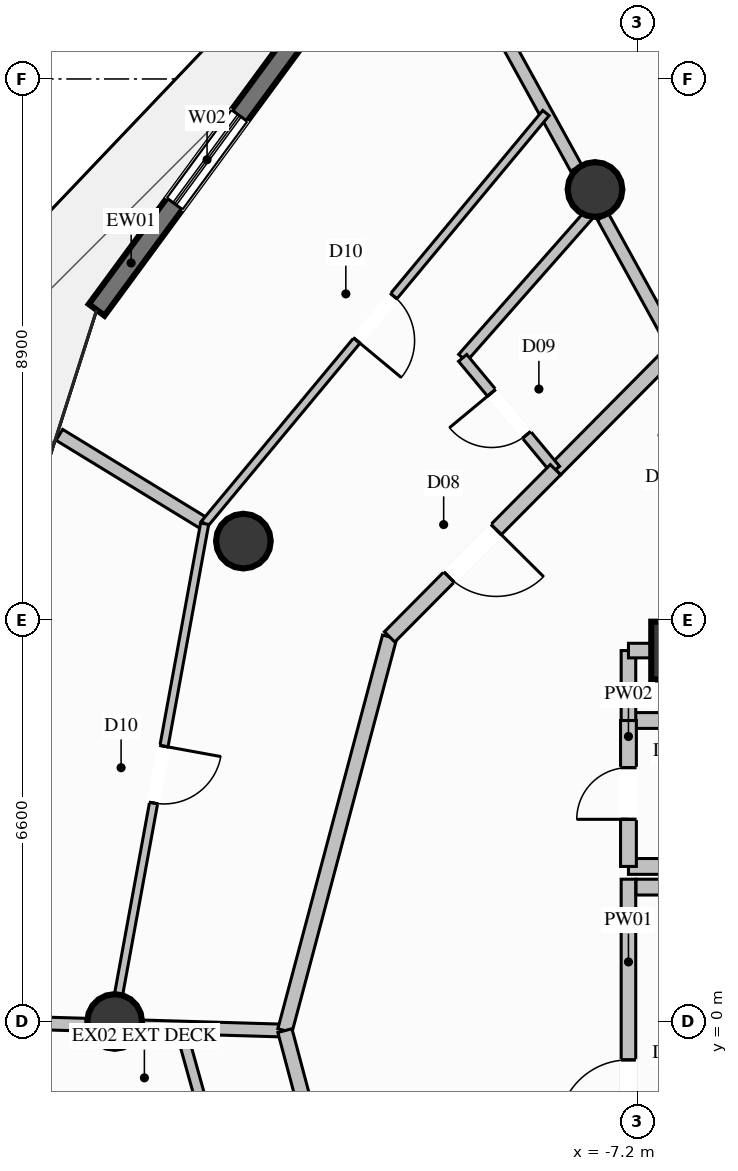
"""IFC4 building model, lengths in metres.
Left out: names, types, materials, properties, quantities, classifications, styles, units other than length and angle.
Written with IfcOpenShell. Run it as: python <this file> out.ifc"""

import sys

from ifc_helpers import new_model, si_unit, direction, frame, frame_2d, origin, origin_2d, place, context, subcontext, project, spatial, rectangle, circle, extrude, element, fill, save


model = new_model("IFC4")
c1 = context("Model", 3, precision=1e-05, world=origin(), true_north=direction((0.0, 1.0)))
c2 = subcontext(c1, "Body", "Model", "MODEL_VIEW")
j1 = project(units=[si_unit("LENGTHUNIT", "METRE"), si_unit("PLANEANGLEUNIT", "RADIAN")], contexts=[c1])
p1 = place(None, origin())
s1 = spatial("IfcSite", under=j1, at=p1, CompositionType="ELEMENT")
p2 = place(p1, origin())
s2 = spatial("IfcBuilding", under=s1, at=p2, CompositionType="ELEMENT")
p3 = place(p2, frame((0.0, 0.0, 209.2)))
s3 = spatial("IfcBuildingStorey", under=s2, at=p3, CompositionType="ELEMENT", Elevation=209.2)
p4 = place(p3, frame((-6.5, 6.1, 0.0), z_axis=(0.0, 0.0, 1.0), x_axis=(1.0, 0.0, 0.0)))
e1 = element("IfcColumn", 1, at=p4, inside=s3, PredefinedType="COLUMN", context=c2, shape_type="SweptSolid", body=[
    extrude(rectangle(XDim=0.95, YDim=0.95, at=origin_2d()), origin(), (0.0, 0.0, 1.0), 3.6),
])
for number, where, z_axis, x_axis in (
    (2, (-7.9, 13.683, 0.0), (0.0, 0.0, 1.0), (1.0, 0.0, 0.0)),
    (3, (-13.683, 7.9, 0.0), (0.0, 0.0, 1.0), (1.0, 0.0, 0.0)),
    (4, (-15.8, 0.0, 0.0), (0.0, 0.0, 1.0), (1.0, 0.0, 0.0)),
):
    element("IfcColumn", number, at=place(p3, frame(where, z_axis=z_axis, x_axis=x_axis)), inside=s3, PredefinedType="COLUMN", context=c2, shape_type="SweptSolid", body=[
        extrude(circle(Radius=0.45, at=origin_2d()), origin(), (0.0, 0.0, 1.0), 3.6),
    ])
p5 = place(p3, frame((-16.096, 11.702, 0.0), z_axis=(0.0, 0.0, 1.0), x_axis=(0.592141869209, 0.805833733924, 0.0)))
e5 = element("IfcWall", 5, at=p5, inside=s3, PredefinedType="SOLIDWALL", context=c2, shape_type="SweptSolid", body=[
    extrude(rectangle(XDim=6.132, YDim=0.32, at=frame_2d((3.066, 0.0))), origin(), (0.0, 0.0, 1.0), 3.36),
])
p6 = place(p5, frame((2.166, 0.0, 0.35)))
e6 = element("IfcOpeningElement", 6, at=p6, cuts=e5, PredefinedType="OPENING", context=c2, shape_type="SweptSolid", body=[
    extrude(rectangle(XDim=1.8, YDim=2.6, at=frame_2d((0.9, 1.3))), frame((0.0, 0.17, 0.0), z_axis=(0.0, -1.0, 0.0), x_axis=(1.0, 0.0, 0.0)), (0.0, 0.0, 1.0), 0.34),
])
p7 = place(p3, frame((-16.282, -7.558, 0.0), z_axis=(0.0, 0.0, 1.0), x_axis=(-0.268256249254, 0.963347592895, 0.0)))
e7 = element("IfcWall", 7, at=p7, inside=s3, PredefinedType="SOLIDWALL", context=c2, shape_type="SweptSolid", body=[
    extrude(rectangle(XDim=6.785, YDim=0.32, at=frame_2d((3.393, 0.0))), origin(), (0.0, 0.0, 1.0), 3.36),
])
p8 = place(p7, frame((4.488, 0.0, 0.35)))
e8 = element("IfcOpeningElement", 8, at=p8, cuts=e7, PredefinedType="OPENING", context=c2, shape_type="SweptSolid", body=[
    extrude(rectangle(XDim=1.8, YDim=2.6, at=frame_2d((0.9, 1.3))), frame((0.0, 0.17, 0.0), z_axis=(0.0, -1.0, 0.0), x_axis=(1.0, 0.0, 0.0)), (0.0, 0.0, 1.0), 0.34),
])
p9 = place(p7, frame((2.842, 0.0, 0.0)))
e9 = element("IfcOpeningElement", 9, at=p9, cuts=e7, PredefinedType="OPENING", context=c2, shape_type="SweptSolid", body=[
    extrude(rectangle(XDim=1.1, YDim=2.2, at=frame_2d((0.55, 1.1))), frame((0.0, 0.17, 0.0), z_axis=(0.0, -1.0, 0.0), x_axis=(1.0, 0.0, 0.0)), (0.0, 0.0, 1.0), 0.34),
])
p10 = place(p3, frame((-7.35, -3.38, 0.0), z_axis=(0.0, 0.0, 1.0), x_axis=(0.0, 1.0, 0.0)))
e10 = element("IfcWall", 10, at=p10, inside=s3, PredefinedType="PARTITIONING", context=c2, shape_type="SweptSolid", body=[
    extrude(rectangle(XDim=5.72, YDim=0.24, at=frame_2d((2.86, 0.0))), origin(), (0.0, 0.0, 1.0), 2.445),
])
p11 = place(p10, frame((1.599, 0.0, 0.0)))
e11 = element("IfcOpeningElement", 11, at=p11, cuts=e10, PredefinedType="OPENING", context=c2, shape_type="SweptSolid", body=[
    extrude(rectangle(XDim=1.15, YDim=2.2, at=frame_2d((0.575, 1.1))), frame((0.0, 0.13, 0.0), z_axis=(0.0, -1.0, 0.0), x_axis=(1.0, 0.0, 0.0)), (0.0, 0.0, 1.0), 0.26),
])
p12 = place(p3, frame((-7.225, 2.21, 0.0), z_axis=(0.0, 0.0, 1.0), x_axis=(1.0, 0.0, 0.0)))
e12 = element("IfcWall", 12, at=p12, inside=s3, PredefinedType="PARTITIONING", context=c2, shape_type="SweptSolid", body=[
    extrude(rectangle(XDim=0.875, YDim=0.26, at=frame_2d((0.438, 0.0))), origin(), (0.0, 0.0, 1.0), 3.36),
])
for number, where, z_axis, x_axis in (
    (13, (-7.35, 4.95, 0.0), (0.0, 0.0, 1.0), (1.0, 0.0, 0.0)),
    (14, (-7.35, 2.55, 0.0), (0.0, 0.0, 1.0), (1.0, 0.0, 0.0)),
):
    element("IfcWall", number, at=place(p3, frame(where, z_axis=z_axis, x_axis=x_axis)), inside=s3, PredefinedType="PARTITIONING", context=c2, shape_type="SweptSolid", body=[
        extrude(rectangle(XDim=0.93, YDim=0.26, at=frame_2d((0.465, 0.0))), origin(), (0.0, 0.0, 1.0), 3.36),
    ])
p13 = place(p3, frame((-7.35, 2.55, 0.0), z_axis=(0.0, 0.0, 1.0), x_axis=(0.0, 1.0, 0.0)))
e15 = element("IfcWall", 15, at=p13, inside=s3, PredefinedType="PARTITIONING", context=c2, shape_type="SweptSolid", body=[
    extrude(rectangle(XDim=2.4, YDim=0.26, at=frame_2d((1.2, 0.0))), origin(), (0.0, 0.0, 1.0), 2.445),
])
p14 = place(p13, frame((0.775, 0.0, 0.0)))
e16 = element("IfcOpeningElement", 16, at=p14, cuts=e15, PredefinedType="OPENING", context=c2, shape_type="SweptSolid", body=[
    extrude(rectangle(XDim=0.85, YDim=2.05, at=frame_2d((0.425, 1.025))), frame((0.0, 0.14, 0.0), z_axis=(0.0, -1.0, 0.0), x_axis=(1.0, 0.0, 0.0)), (0.0, 0.0, 1.0), 0.28),
])
p15 = place(p3, frame((-7.35, 4.95, 0.0), z_axis=(0.0, 0.0, 1.0), x_axis=(0.0, 1.0, 0.0)))
e17 = element("IfcWall", 17, at=p15, inside=s3, PredefinedType="PARTITIONING", context=c2, shape_type="SweptSolid", body=[
    extrude(rectangle(XDim=1.15, YDim=0.24, at=frame_2d((0.575, 0.0))), origin(), (0.0, 0.0, 1.0), 2.445),
])
p16 = place(p3, frame((-7.35, 6.1, 0.0), z_axis=(0.0, 0.0, 1.0), x_axis=(1.0, 0.0, 0.0)))
e18 = element("IfcWall", 18, at=p16, inside=s3, PredefinedType="PARTITIONING", context=c2, shape_type="SweptSolid", body=[
    extrude(rectangle(XDim=0.85, YDim=0.24, at=frame_2d((0.425, 0.0))), origin(), (0.0, 0.0, 1.0), 2.801),
])
p17 = place(p3, frame((-6.575, 11.065, 0.0), z_axis=(0.0, 0.0, 1.0), x_axis=(-0.482312715348, 0.875999112222, 0.0)))
e19 = element("IfcWall", 19, at=p17, inside=s3, PredefinedType="PARTITIONING", context=c2, shape_type="SweptSolid", body=[
    extrude(rectangle(XDim=2.474, YDim=0.21, at=frame_2d((1.237, 0.0))), origin(), (0.0, 0.0, 1.0), 2.801),
])
p18 = place(p3, frame((-8.21, 14.036, 0.0), z_axis=(0.0, 0.0, 1.0), x_axis=(-0.482207793196, 0.876056872686, 0.0)))
e20 = element("IfcWall", 20, at=p18, inside=s3, PredefinedType="PARTITIONING", context=c2, shape_type="SweptSolid", body=[
    extrude(rectangle(XDim=4.507, YDim=0.21, at=frame_2d((2.253, 0.0))), origin(), (0.0, 0.0, 1.0), 3.36),
])
p19 = place(p3, frame((-13.0, -0.15, 0.0), z_axis=(0.0, 0.0, 1.0), x_axis=(-0.999566309164, 0.029448150771, 0.0)))
e21 = element("IfcWall", 21, at=p19, inside=s3, PredefinedType="PARTITIONING", context=c2, shape_type="SweptSolid", body=[
    extrude(rectangle(XDim=2.338, YDim=0.21, at=frame_2d((1.169, 0.0))), origin(), (0.0, 0.0, 1.0), 3.36),
])
p20 = place(p3, frame((-16.267, -0.053, 0.0), z_axis=(0.0, 0.0, 1.0), x_axis=(-0.999559800985, 0.029668236467, 0.0)))
e22 = element("IfcWall", 22, at=p20, inside=s3, PredefinedType="PARTITIONING", context=c2, shape_type="SweptSolid", body=[
    extrude(rectangle(XDim=1.786, YDim=0.21, at=frame_2d((0.893, 0.0))), origin(), (0.0, 0.0, 1.0), 3.36),
])
p21 = place(p3, frame((-6.575, 11.065, 0.0), z_axis=(0.0, 0.0, 1.0), x_axis=(-0.704271845888, -0.709930395947, 0.0)))
e23 = element("IfcWall", 23, at=p21, inside=s3, PredefinedType="PARTITIONING", context=c2, shape_type="SweptSolid", body=[
    extrude(rectangle(XDim=2.804, YDim=0.24, at=frame_2d((1.402, 0.0))), origin(), (0.0, 0.0, 1.0), 3.36),
])
p22 = place(p3, frame((-7.87, 13.417, 0.0), z_axis=(0.0, 0.0, 1.0), x_axis=(-0.661193309015, -0.750215574428, 0.0)))
e24 = element("IfcWall", 24, at=p22, inside=s3, PredefinedType="PLUMBINGWALL", context=c2, shape_type="SweptSolid", body=[
    extrude(rectangle(XDim=3.338, YDim=0.175, at=frame_2d((1.669, 0.0))), origin(), (0.0, 0.0, 1.0), 2.929),
])
p23 = place(p3, frame((-8.55, 9.074, 0.0), z_axis=(0.0, 0.0, 1.0), x_axis=(-0.638766783966, 0.769400413115, 0.0)))
e25 = element("IfcWall", 25, at=p23, inside=s3, PredefinedType="PLUMBINGWALL", context=c2, shape_type="SweptSolid", body=[
    extrude(rectangle(XDim=2.39, YDim=0.175, at=frame_2d((1.195, 0.0))), origin(), (0.0, 0.0, 1.0), 3.36),
])
p24 = place(p23, frame((0.745, 0.0, 0.0)))
e26 = element("IfcOpeningElement", 26, at=p24, cuts=e25, PredefinedType="OPENING", context=c2, shape_type="SweptSolid", body=[
    extrude(rectangle(XDim=0.9, YDim=2.1, at=frame_2d((0.45, 1.05))), frame((0.0, 0.098, 0.0), z_axis=(0.0, -1.0, 0.0), x_axis=(1.0, 0.0, 0.0)), (0.0, 0.0, 1.0), 0.195),
])
p25 = place(p3, frame((-14.32, 8.186, 0.0), z_axis=(0.0, 0.0, 1.0), x_axis=(-0.853055569856, 0.521820078895, 0.0)))
e27 = element("IfcWall", 27, at=p25, inside=s3, PredefinedType="PARTITIONING", context=c2, shape_type="SweptSolid", body=[
    extrude(rectangle(XDim=2.802, YDim=0.21, at=frame_2d((1.401, 0.0))), origin(), (0.0, 0.0, 1.0), 3.36),
])
p26 = place(p3, frame((-11.278, 6.325, 0.0), z_axis=(0.0, 0.0, 1.0), x_axis=(-0.257007135557, -0.966409505475, 0.0)))
e28 = element("IfcWall", 28, at=p26, inside=s3, PredefinedType="PARTITIONING", context=c2, shape_type="SweptSolid", body=[
    extrude(rectangle(XDim=6.7, YDim=0.24, at=frame_2d((3.35, 0.0))), origin(), (0.0, 0.0, 1.0), 3.36),
])
p27 = place(p3, frame((-8.55, 9.074, 0.0), z_axis=(0.0, 0.0, 1.0), x_axis=(-0.704390934975, -0.709812236246, 0.0)))
e29 = element("IfcWall", 29, at=p27, inside=s3, PredefinedType="PARTITIONING", context=c2, shape_type="SweptSolid", body=[
    extrude(rectangle(XDim=3.873, YDim=0.24, at=frame_2d((1.937, 0.0))), origin(), (0.0, 0.0, 1.0), 3.36),
])
p28 = place(p27, frame((1.386, 0.0, 0.0)))
e30 = element("IfcOpeningElement", 30, at=p28, cuts=e29, PredefinedType="OPENING", context=c2, shape_type="SweptSolid", body=[
    extrude(rectangle(XDim=1.1, YDim=2.3, at=frame_2d((0.55, 1.15))), frame((0.0, 0.13, 0.0), z_axis=(0.0, -1.0, 0.0), x_axis=(1.0, 0.0, 0.0)), (0.0, 0.0, 1.0), 0.26),
])
p29 = place(p3, frame((-8.707, 14.94, 0.0), z_axis=(0.0, 0.0, 1.0), x_axis=(-0.639161138837, -0.769072843495, 0.0)))
e31 = element("IfcWall", 31, at=p29, inside=s3, PredefinedType="PARTITIONING", context=c2, shape_type="SweptSolid", body=[
    extrude(rectangle(XDim=8.782, YDim=0.135, at=frame_2d((4.391, 0.0))), origin(), (0.0, 0.0, 1.0), 3.36),
])
p30 = place(p29, frame((3.916, 0.0, 0.0)))
e32 = element("IfcOpeningElement", 32, at=p30, cuts=e31, PredefinedType="OPENING", context=c2, shape_type="SweptSolid", body=[
    extrude(rectangle(XDim=0.95, YDim=2.1, at=frame_2d((0.475, 1.05))), frame((0.0, 0.078, 0.0), z_axis=(0.0, -1.0, 0.0), x_axis=(1.0, 0.0, 0.0)), (0.0, 0.0, 1.0), 0.155),
])
p31 = place(p3, frame((-14.32, 8.186, 0.0), z_axis=(0.0, 0.0, 1.0), x_axis=(-0.179886727607, -0.983687331031, 0.0)))
e33 = element("IfcWall", 33, at=p31, inside=s3, PredefinedType="PARTITIONING", context=c2, shape_type="SweptSolid", body=[
    extrude(rectangle(XDim=8.389, YDim=0.135, at=frame_2d((4.194, 0.0))), origin(), (0.0, 0.0, 1.0), 2.929),
])
p32 = place(p31, frame((3.719, 0.0, 0.0)))
e34 = element("IfcOpeningElement", 34, at=p32, cuts=e33, PredefinedType="OPENING", context=c2, shape_type="SweptSolid", body=[
    extrude(rectangle(XDim=0.95, YDim=2.1, at=frame_2d((0.475, 1.05))), frame((0.0, 0.078, 0.0), z_axis=(0.0, -1.0, 0.0), x_axis=(1.0, 0.0, 0.0)), (0.0, 0.0, 1.0), 0.155),
])
p33 = place(p3, frame((-13.0, -0.15, 0.0), z_axis=(0.0, 0.0, 1.0), x_axis=(0.256944245483, -0.966426228283, 0.0)))
e35 = element("IfcWall", 35, at=p33, inside=s3, PredefinedType="PARTITIONING", context=c2, shape_type="SweptSolid", body=[
    extrude(rectangle(XDim=2.813, YDim=0.24, at=frame_2d((1.407, 0.0))), origin(), (0.0, 0.0, 1.0), 3.36),
])
p34 = place(p3, frame((-14.718, -0.099, 0.0), z_axis=(0.0, 0.0, 1.0), x_axis=(0.268411547154, -0.963304334753, 0.0)))
e36 = element("IfcWall", 36, at=p34, inside=s3, PredefinedType="PLUMBINGWALL", context=c2, shape_type="SweptSolid", body=[
    extrude(rectangle(XDim=3.182, YDim=0.175, at=frame_2d((1.591, 0.0))), origin(), (0.0, 0.0, 1.0), 3.36),
])
p35 = place(p6, origin())
e37 = element("IfcWindow", 37, at=p35, inside=s3, PartitioningType="SINGLE_PANEL", PredefinedType="WINDOW", context=c2, shape_type="SweptSolid", body=[
    extrude(rectangle(XDim=1.8, YDim=2.6, at=frame_2d((0.9, 1.3))), frame((0.0, 0.03, 0.0), z_axis=(0.0, -1.0, 0.0), x_axis=(1.0, 0.0, 0.0)), (0.0, 0.0, 1.0), 0.06),
])
fill(e6, e37)
p36 = place(p11, origin())
e38 = element("IfcDoor", 38, at=p36, inside=s3, OperationType="SINGLE_SWING_LEFT", PredefinedType="DOOR", context=c2, shape_type="SweptSolid", body=[
    extrude(rectangle(XDim=1.15, YDim=2.2, at=frame_2d((0.575, 1.1))), frame((0.0, 0.025, 0.0), z_axis=(0.0, -1.0, 0.0), x_axis=(1.0, 0.0, 0.0)), (0.0, 0.0, 1.0), 0.05),
])
fill(e11, e38)
p37 = place(p14, origin())
e39 = element("IfcDoor", 39, at=p37, inside=s3, OperationType="SINGLE_SWING_LEFT", PredefinedType="DOOR", context=c2, shape_type="SweptSolid", body=[
    extrude(rectangle(XDim=0.85, YDim=2.05, at=frame_2d((0.425, 1.025))), frame((0.0, 0.025, 0.0), z_axis=(0.0, -1.0, 0.0), x_axis=(1.0, 0.0, 0.0)), (0.0, 0.0, 1.0), 0.05),
])
fill(e16, e39)
p38 = place(p24, origin())
e40 = element("IfcDoor", 40, at=p38, inside=s3, OperationType="SINGLE_SWING_RIGHT", PredefinedType="DOOR", context=c2, shape_type="SweptSolid", body=[
    extrude(rectangle(XDim=0.9, YDim=2.1, at=frame_2d((0.45, 1.05))), frame((0.0, 0.025, 0.0), z_axis=(0.0, -1.0, 0.0), x_axis=(1.0, 0.0, 0.0)), (0.0, 0.0, 1.0), 0.05),
])
fill(e26, e40)
p39 = place(p28, origin())
e41 = element("IfcDoor", 41, at=p39, inside=s3, OperationType="SINGLE_SWING_LEFT", PredefinedType="DOOR", context=c2, shape_type="SweptSolid", body=[
    extrude(rectangle(XDim=1.1, YDim=2.3, at=frame_2d((0.55, 1.15))), frame((0.0, 0.025, 0.0), z_axis=(0.0, -1.0, 0.0), x_axis=(1.0, 0.0, 0.0)), (0.0, 0.0, 1.0), 0.05),
])
fill(e30, e41)
p40 = place(p30, origin())
e42 = element("IfcDoor", 42, at=p40, inside=s3, OperationType="SINGLE_SWING_RIGHT", PredefinedType="DOOR", context=c2, shape_type="SweptSolid", body=[
    extrude(rectangle(XDim=0.95, YDim=2.1, at=frame_2d((0.475, 1.05))), frame((0.0, 0.025, 0.0), z_axis=(0.0, -1.0, 0.0), x_axis=(1.0, 0.0, 0.0)), (0.0, 0.0, 1.0), 0.05),
])
fill(e32, e42)
p41 = place(p32, origin())
e43 = element("IfcDoor", 43, at=p41, inside=s3, OperationType="SINGLE_SWING_LEFT", PredefinedType="DOOR", context=c2, shape_type="SweptSolid", body=[
    extrude(rectangle(XDim=0.95, YDim=2.1, at=frame_2d((0.475, 1.05))), frame((0.0, 0.025, 0.0), z_axis=(0.0, -1.0, 0.0), x_axis=(1.0, 0.0, 0.0)), (0.0, 0.0, 1.0), 0.05),
])
fill(e34, e43)
save(model, sys.argv[1])
